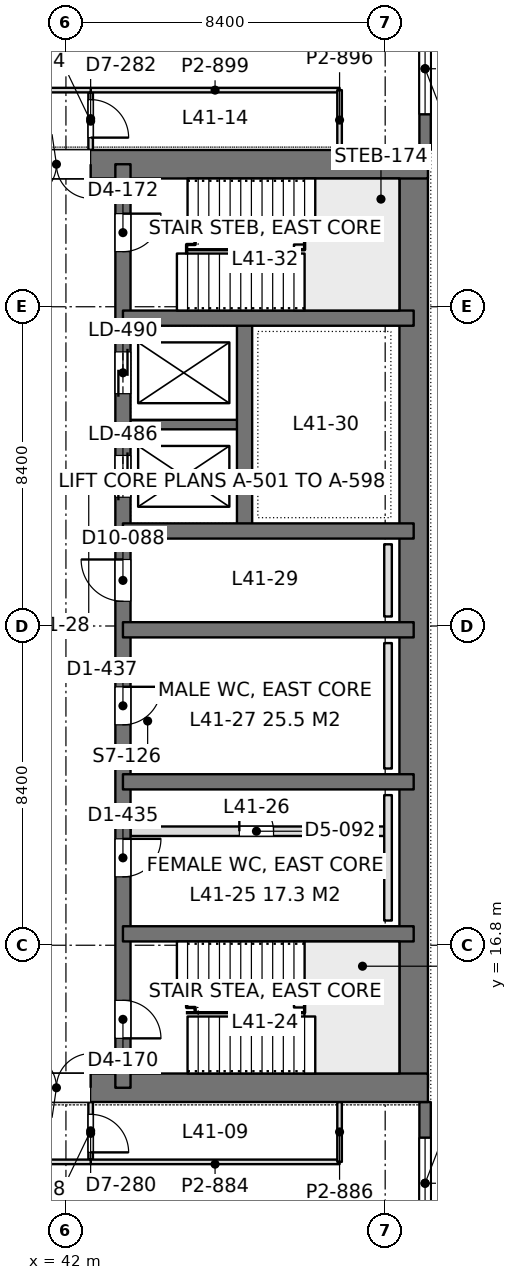
"""IFC4 building model, lengths in metres.
Left out: names, types, materials, properties, quantities, classifications, styles, units other than length and angle.
Written with IfcOpenShell. Run it as: python <this file> out.ifc"""

import sys

from ifc_helpers import new_model, si_unit, direction, frame, frame_2d, origin, place, context, subcontext, project, spatial, rectangle, extrude, element, fill, save


model = new_model("IFC4")
c1 = context("Model", 3, precision=1e-05, world=origin(), true_north=direction((0.0, 1.0)))
c2 = subcontext(c1, "Body", "Model", "MODEL_VIEW")
j1 = project(units=[si_unit("LENGTHUNIT", "METRE"), si_unit("PLANEANGLEUNIT", "RADIAN")], contexts=[c1])
p1 = place(None, origin())
s1 = spatial("IfcSite", under=j1, at=p1, CompositionType="ELEMENT")
p2 = place(p1, origin())
s2 = spatial("IfcBuilding", under=s1, at=p2, CompositionType="ELEMENT")
p3 = place(p2, frame((0.0, 0.0, 181.8)))
s3 = spatial("IfcBuildingStorey", under=s2, at=p3, CompositionType="ELEMENT", Elevation=181.8)
p4 = place(p3, frame((33.675, 13.05, 0.0), z_axis=(0.0, 0.0, 1.0), x_axis=(1.0, 0.0, 0.0)))
e1 = element("IfcWall", 1, at=p4, inside=s3, PredefinedType="SHEAR", context=c2, shape_type="SweptSolid", body=[
    extrude(rectangle(XDim=17.85, YDim=0.75, at=frame_2d((8.925, 0.0))), origin(), (0.0, 0.0, 1.0), 4.2),
])
p5 = place(p4, frame((7.175, 0.0, 0.0)))
e2 = element("IfcOpeningElement", 2, at=p5, cuts=e1, PredefinedType="OPENING", context=c2, shape_type="SweptSolid", body=[
    extrude(rectangle(XDim=1.8, YDim=2.4, at=frame_2d((0.9, 1.2))), frame((0.0, 0.385, 0.0), z_axis=(0.0, -1.0, 0.0), x_axis=(1.0, 0.0, 0.0)), (0.0, 0.0, 1.0), 0.77),
])
p6 = place(p3, frame((33.675, 37.35, 0.0), z_axis=(0.0, 0.0, 1.0), x_axis=(1.0, 0.0, 0.0)))
e3 = element("IfcWall", 3, at=p6, inside=s3, PredefinedType="SHEAR", context=c2, shape_type="SweptSolid", body=[
    extrude(rectangle(XDim=17.85, YDim=0.75, at=frame_2d((8.925, 0.0))), origin(), (0.0, 0.0, 1.0), 4.2),
])
p7 = place(p6, frame((7.175, 0.0, 0.0)))
e4 = element("IfcOpeningElement", 4, at=p7, cuts=e3, PredefinedType="OPENING", context=c2, shape_type="SweptSolid", body=[
    extrude(rectangle(XDim=1.8, YDim=2.4, at=frame_2d((0.9, 1.2))), frame((0.0, 0.385, 0.0), z_axis=(0.0, -1.0, 0.0), x_axis=(1.0, 0.0, 0.0)), (0.0, 0.0, 1.0), 0.77),
])
p8 = place(p3, frame((51.15, 13.05, 0.0), z_axis=(0.0, 0.0, 1.0), x_axis=(0.0, 1.0, 0.0)))
e5 = element("IfcWall", 5, at=p8, inside=s3, PredefinedType="SHEAR", context=c2, shape_type="SweptSolid", body=[
    extrude(rectangle(XDim=24.3, YDim=0.75, at=frame_2d((12.15, 0.0))), origin(), (0.0, 0.0, 1.0), 4.2),
])
p9 = place(p3, frame((43.5, 13.05, 0.0), z_axis=(0.0, 0.0, 1.0), x_axis=(0.0, 1.0, 0.0)))
e6 = element("IfcWall", 6, at=p9, inside=s3, PredefinedType="SHEAR", context=c2, shape_type="SweptSolid", body=[
    extrude(rectangle(XDim=24.3, YDim=0.4, at=frame_2d((12.15, 0.0))), origin(), (0.0, 0.0, 1.0), 4.2),
])
p10 = place(p9, frame((1.3, 0.0, 0.0)))
e7 = element("IfcOpeningElement", 7, at=p10, cuts=e6, PredefinedType="OPENING", context=c2, shape_type="SweptSolid", body=[
    extrude(rectangle(XDim=1.0, YDim=2.2, at=frame_2d((0.5, 1.1))), frame((0.0, 0.21, 0.0), z_axis=(0.0, -1.0, 0.0), x_axis=(1.0, 0.0, 0.0)), (0.0, 0.0, 1.0), 0.42),
])
p11 = place(p9, frame((22.0, 0.0, 0.0)))
e8 = element("IfcOpeningElement", 8, at=p11, cuts=e6, PredefinedType="OPENING", context=c2, shape_type="SweptSolid", body=[
    extrude(rectangle(XDim=1.0, YDim=2.2, at=frame_2d((0.5, 1.1))), frame((0.0, 0.21, 0.0), z_axis=(0.0, -1.0, 0.0), x_axis=(1.0, 0.0, 0.0)), (0.0, 0.0, 1.0), 0.42),
])
p12 = place(p9, frame((5.55, 0.0, 0.0)))
e9 = element("IfcOpeningElement", 9, at=p12, cuts=e6, PredefinedType="OPENING", context=c2, shape_type="SweptSolid", body=[
    extrude(rectangle(XDim=1.0, YDim=2.2, at=frame_2d((0.5, 1.1))), frame((0.0, 0.21, 0.0), z_axis=(0.0, -1.0, 0.0), x_axis=(1.0, 0.0, 0.0)), (0.0, 0.0, 1.0), 0.42),
])
p13 = place(p9, frame((9.55, 0.0, 0.0)))
e10 = element("IfcOpeningElement", 10, at=p13, cuts=e6, PredefinedType="OPENING", context=c2, shape_type="SweptSolid", body=[
    extrude(rectangle(XDim=1.0, YDim=2.2, at=frame_2d((0.5, 1.1))), frame((0.0, 0.21, 0.0), z_axis=(0.0, -1.0, 0.0), x_axis=(1.0, 0.0, 0.0)), (0.0, 0.0, 1.0), 0.42),
])
p14 = place(p9, frame((12.8, 0.0, 0.0)))
e11 = element("IfcOpeningElement", 11, at=p14, cuts=e6, PredefinedType="OPENING", context=c2, shape_type="SweptSolid", body=[
    extrude(rectangle(XDim=1.1, YDim=2.2, at=frame_2d((0.55, 1.1))), frame((0.0, 0.21, 0.0), z_axis=(0.0, -1.0, 0.0), x_axis=(1.0, 0.0, 0.0)), (0.0, 0.0, 1.0), 0.42),
])
p15 = place(p9, frame((15.538, 0.0, 0.0)))
e12 = element("IfcOpeningElement", 12, at=p15, cuts=e6, PredefinedType="OPENING", context=c2, shape_type="SweptSolid", body=[
    extrude(rectangle(XDim=1.1, YDim=2.2, at=frame_2d((0.55, 1.1))), frame((0.0, 0.21, 0.0), z_axis=(0.0, -1.0, 0.0), x_axis=(1.0, 0.0, 0.0)), (0.0, 0.0, 1.0), 0.42),
])
p16 = place(p9, frame((18.262, 0.0, 0.0)))
e13 = element("IfcOpeningElement", 13, at=p16, cuts=e6, PredefinedType="OPENING", context=c2, shape_type="SweptSolid", body=[
    extrude(rectangle(XDim=1.1, YDim=2.2, at=frame_2d((0.55, 1.1))), frame((0.0, 0.21, 0.0), z_axis=(0.0, -1.0, 0.0), x_axis=(1.0, 0.0, 0.0)), (0.0, 0.0, 1.0), 0.42),
])
for number, where, z_axis, x_axis in (
    (14, (51.15, 17.1, 0.0), (0.0, 0.0, 1.0), (-1.0, 0.0, 0.0)),
    (15, (51.15, 21.1, 0.0), (0.0, 0.0, 1.0), (-1.0, 0.0, 0.0)),
    (16, (51.15, 25.1, 0.0), (0.0, 0.0, 1.0), (-1.0, 0.0, 0.0)),
    (17, (51.15, 27.7, 0.0), (0.0, 0.0, 1.0), (-1.0, 0.0, 0.0)),
    (18, (51.15, 33.3, 0.0), (0.0, 0.0, 1.0), (-1.0, 0.0, 0.0)),
):
    element("IfcWall", number, at=place(p3, frame(where, z_axis=z_axis, x_axis=x_axis)), inside=s3, PredefinedType="SHEAR", context=c2, shape_type="SweptSolid", body=[
        extrude(rectangle(XDim=7.65, YDim=0.4, at=frame_2d((3.825, 0.0))), origin(), (0.0, 0.0, 1.0), 4.2),
    ])
p17 = place(p3, frame((46.7, 27.7, 0.0), z_axis=(0.0, 0.0, 1.0), x_axis=(0.0, 1.0, 0.0)))
e19 = element("IfcWall", 19, at=p17, inside=s3, PredefinedType="SHEAR", context=c2, shape_type="SweptSolid", body=[
    extrude(rectangle(XDim=5.6, YDim=0.4, at=frame_2d((2.8, 0.0))), origin(), (0.0, 0.0, 1.0), 4.2),
])
p18 = place(p3, frame((46.7, 30.5, 0.0), z_axis=(0.0, 0.0, 1.0), x_axis=(-1.0, 0.0, 0.0)))
e20 = element("IfcWall", 20, at=p18, inside=s3, PredefinedType="SHEAR", context=c2, shape_type="SweptSolid", body=[
    extrude(rectangle(XDim=3.2, YDim=0.25, at=frame_2d((1.6, 0.0))), origin(), (0.0, 0.0, 1.0), 4.2),
])
p19 = place(p3, frame((51.45, 42.0, 0.0), z_axis=(0.0, 0.0, 1.0), x_axis=(0.0, -1.0, 0.0)))
e21 = element("IfcWall", 21, at=p19, inside=s3, PredefinedType="SOLIDWALL", context=c2, shape_type="SweptSolid", body=[
    extrude(rectangle(XDim=4.275, YDim=0.3, at=frame_2d((2.137, 0.0))), origin(), (0.0, 0.0, 1.0), 4.05),
])
p20 = place(p19, frame((0.938, 0.0, 0.9)))
e22 = element("IfcOpeningElement", 22, at=p20, cuts=e21, PredefinedType="OPENING", context=c2, shape_type="SweptSolid", body=[
    extrude(rectangle(XDim=2.4, YDim=1.9, at=frame_2d((1.2, 0.95))), frame((0.0, 0.16, 0.0), z_axis=(0.0, -1.0, 0.0), x_axis=(1.0, 0.0, 0.0)), (0.0, 0.0, 1.0), 0.32),
])
p21 = place(p3, frame((51.45, 12.675, 0.0), z_axis=(0.0, 0.0, 1.0), x_axis=(0.0, -1.0, 0.0)))
e23 = element("IfcWall", 23, at=p21, inside=s3, PredefinedType="SOLIDWALL", context=c2, shape_type="SweptSolid", body=[
    extrude(rectangle(XDim=4.275, YDim=0.3, at=frame_2d((2.138, 0.0))), origin(), (0.0, 0.0, 1.0), 4.05),
])
p22 = place(p21, frame((0.938, 0.0, 0.9)))
e24 = element("IfcOpeningElement", 24, at=p22, cuts=e23, PredefinedType="OPENING", context=c2, shape_type="SweptSolid", body=[
    extrude(rectangle(XDim=2.4, YDim=1.9, at=frame_2d((1.2, 0.95))), frame((0.0, 0.16, 0.0), z_axis=(0.0, -1.0, 0.0), x_axis=(1.0, 0.0, 0.0)), (0.0, 0.0, 1.0), 0.32),
])
p23 = place(p3, frame((7.748, 11.1, 0.0), z_axis=(0.0, 0.0, 1.0), x_axis=(1.0, 0.0, 0.0)))
e25 = element("IfcWall", 25, at=p23, inside=s3, PredefinedType="PARTITIONING", context=c2, shape_type="SweptSolid", body=[
    extrude(rectangle(XDim=34.904, YDim=0.12, at=frame_2d((17.452, 0.0))), origin(), (0.0, 0.0, 1.0), 3.55),
])
p24 = place(p23, frame((10.735, 0.0, 0.0)))
e26 = element("IfcOpeningElement", 26, at=p24, cuts=e25, PredefinedType="OPENING", context=c2, shape_type="SweptSolid", body=[
    extrude(rectangle(XDim=1.8, YDim=2.2, at=frame_2d((0.9, 1.1))), frame((0.0, 0.07, 0.0), z_axis=(0.0, -1.0, 0.0), x_axis=(1.0, 0.0, 0.0)), (0.0, 0.0, 1.0), 0.14),
])
p25 = place(p23, frame((22.369, 0.0, 0.0)))
e27 = element("IfcOpeningElement", 27, at=p25, cuts=e25, PredefinedType="OPENING", context=c2, shape_type="SweptSolid", body=[
    extrude(rectangle(XDim=1.8, YDim=2.2, at=frame_2d((0.9, 1.1))), frame((0.0, 0.07, 0.0), z_axis=(0.0, -1.0, 0.0), x_axis=(1.0, 0.0, 0.0)), (0.0, 0.0, 1.0), 0.14),
])
p26 = place(p3, frame((42.65, 11.158, 0.0), z_axis=(0.0, 0.0, 1.0), x_axis=(0.0, 1.0, 0.0)))
e28 = element("IfcWall", 28, at=p26, inside=s3, PredefinedType="PARTITIONING", context=c2, shape_type="SweptSolid", body=[
    extrude(rectangle(XDim=1.518, YDim=0.12, at=frame_2d((0.759, 0.0))), origin(), (0.0, 0.0, 1.0), 4.05),
])
p27 = place(p26, frame((0.192, 0.0, 0.0)))
e29 = element("IfcOpeningElement", 29, at=p27, cuts=e28, PredefinedType="OPENING", context=c2, shape_type="SweptSolid", body=[
    extrude(rectangle(XDim=1.0, YDim=2.4, at=frame_2d((0.5, 1.2))), frame((0.0, 0.07, 0.0), z_axis=(0.0, -1.0, 0.0), x_axis=(1.0, 0.0, 0.0)), (0.0, 0.0, 1.0), 0.14),
])
p28 = place(p3, frame((42.648, 11.1, 0.0), z_axis=(0.0, 0.0, 1.0), x_axis=(1.0, 0.0, 0.0)))
e30 = element("IfcWall", 30, at=p28, inside=s3, PredefinedType="PARTITIONING", context=c2, shape_type="SweptSolid", body=[
    extrude(rectangle(XDim=6.552, YDim=0.12, at=frame_2d((3.276, 0.0))), origin(), (0.0, 0.0, 1.0), 4.05),
])
p29 = place(p3, frame((49.2, 11.1, 0.0), z_axis=(0.0, 0.0, 1.0), x_axis=(0.0, 1.0, 0.0)))
e31 = element("IfcWall", 31, at=p29, inside=s3, PredefinedType="PARTITIONING", context=c2, shape_type="SweptSolid", body=[
    extrude(rectangle(XDim=1.576, YDim=0.12, at=frame_2d((0.788, 0.0))), origin(), (0.0, 0.0, 1.0), 4.05),
])
p30 = place(p3, frame((7.748, 39.3, 0.0), z_axis=(0.0, 0.0, 1.0), x_axis=(1.0, 0.0, 0.0)))
e32 = element("IfcWall", 32, at=p30, inside=s3, PredefinedType="PARTITIONING", context=c2, shape_type="SweptSolid", body=[
    extrude(rectangle(XDim=34.904, YDim=0.12, at=frame_2d((17.452, 0.0))), origin(), (0.0, 0.0, 1.0), 3.55),
])
p31 = place(p30, frame((10.735, 0.0, 0.0)))
e33 = element("IfcOpeningElement", 33, at=p31, cuts=e32, PredefinedType="OPENING", context=c2, shape_type="SweptSolid", body=[
    extrude(rectangle(XDim=1.8, YDim=2.2, at=frame_2d((0.9, 1.1))), frame((0.0, 0.07, 0.0), z_axis=(0.0, -1.0, 0.0), x_axis=(1.0, 0.0, 0.0)), (0.0, 0.0, 1.0), 0.14),
])
p32 = place(p30, frame((22.369, 0.0, 0.0)))
e34 = element("IfcOpeningElement", 34, at=p32, cuts=e32, PredefinedType="OPENING", context=c2, shape_type="SweptSolid", body=[
    extrude(rectangle(XDim=1.8, YDim=2.2, at=frame_2d((0.9, 1.1))), frame((0.0, 0.07, 0.0), z_axis=(0.0, -1.0, 0.0), x_axis=(1.0, 0.0, 0.0)), (0.0, 0.0, 1.0), 0.14),
])
p33 = place(p3, frame((42.65, 37.724, 0.0), z_axis=(0.0, 0.0, 1.0), x_axis=(0.0, 1.0, 0.0)))
e35 = element("IfcWall", 35, at=p33, inside=s3, PredefinedType="PARTITIONING", context=c2, shape_type="SweptSolid", body=[
    extrude(rectangle(XDim=1.518, YDim=0.12, at=frame_2d((0.759, 0.0))), origin(), (0.0, 0.0, 1.0), 4.05),
])
p34 = place(p33, frame((0.326, 0.0, 0.0)))
e36 = element("IfcOpeningElement", 36, at=p34, cuts=e35, PredefinedType="OPENING", context=c2, shape_type="SweptSolid", body=[
    extrude(rectangle(XDim=1.0, YDim=2.4, at=frame_2d((0.5, 1.2))), frame((0.0, 0.07, 0.0), z_axis=(0.0, -1.0, 0.0), x_axis=(1.0, 0.0, 0.0)), (0.0, 0.0, 1.0), 0.14),
])
p35 = place(p3, frame((42.648, 39.3, 0.0), z_axis=(0.0, 0.0, 1.0), x_axis=(1.0, 0.0, 0.0)))
e37 = element("IfcWall", 37, at=p35, inside=s3, PredefinedType="PARTITIONING", context=c2, shape_type="SweptSolid", body=[
    extrude(rectangle(XDim=6.552, YDim=0.12, at=frame_2d((3.276, 0.0))), origin(), (0.0, 0.0, 1.0), 3.69),
])
p36 = place(p3, frame((49.2, 37.724, 0.0), z_axis=(0.0, 0.0, 1.0), x_axis=(0.0, 1.0, 0.0)))
e38 = element("IfcWall", 38, at=p36, inside=s3, PredefinedType="PARTITIONING", context=c2, shape_type="SweptSolid", body=[
    extrude(rectangle(XDim=1.576, YDim=0.12, at=frame_2d((0.788, 0.0))), origin(), (0.0, 0.0, 1.0), 4.05),
])
p37 = place(p3, frame((43.7, 19.8, 0.0), z_axis=(0.0, 0.0, 1.0), x_axis=(1.0, 0.0, 0.0)))
e39 = element("IfcWall", 39, at=p37, inside=s3, PredefinedType="PARTITIONING", context=c2, shape_type="SweptSolid", body=[
    extrude(rectangle(XDim=6.675, YDim=0.25, at=frame_2d((3.337, 0.0))), origin(), (0.0, 0.0, 1.0), 4.0),
])
p38 = place(p37, frame((2.863, 0.0, 0.0)))
e40 = element("IfcOpeningElement", 40, at=p38, cuts=e39, PredefinedType="OPENING", context=c2, shape_type="SweptSolid", body=[
    extrude(rectangle(XDim=0.9, YDim=2.2, at=frame_2d((0.45, 1.1))), frame((0.0, 0.135, 0.0), z_axis=(0.0, -1.0, 0.0), x_axis=(1.0, 0.0, 0.0)), (0.0, 0.0, 1.0), 0.27),
])
for number, where, z_axis, x_axis in (
    (41, (50.475, 17.45, 0.0), (0.0, 0.0, 1.0), (0.0, 1.0, 0.0)),
    (42, (50.475, 21.45, 0.0), (0.0, 0.0, 1.0), (0.0, 1.0, 0.0)),
):
    element("IfcWall", number, at=place(p3, frame(where, z_axis=z_axis, x_axis=x_axis)), inside=s3, PredefinedType="PLUMBINGWALL", context=c2, shape_type="SweptSolid", body=[
        extrude(rectangle(XDim=3.3, YDim=0.2, at=frame_2d((1.65, 0.0))), origin(), (0.0, 0.0, 1.0), 1.2),
    ])
p39 = place(p3, frame((50.475, 25.45, 0.0), z_axis=(0.0, 0.0, 1.0), x_axis=(0.0, 1.0, 0.0)))
e43 = element("IfcWall", 43, at=p39, inside=s3, PredefinedType="PLUMBINGWALL", context=c2, shape_type="SweptSolid", body=[
    extrude(rectangle(XDim=1.9, YDim=0.2, at=frame_2d((0.95, 0.0))), origin(), (0.0, 0.0, 1.0), 1.2),
])
p40 = place(p20, origin())
e44 = element("IfcWindow", 44, at=p40, inside=s3, PartitioningType="SINGLE_PANEL", PredefinedType="WINDOW", context=c2, shape_type="SweptSolid", body=[
    extrude(rectangle(XDim=2.4, YDim=1.9, at=frame_2d((1.2, 0.95))), frame((0.0, 0.03, 0.0), z_axis=(0.0, -1.0, 0.0), x_axis=(1.0, 0.0, 0.0)), (0.0, 0.0, 1.0), 0.06),
])
fill(e22, e44)
p41 = place(p22, origin())
e45 = element("IfcWindow", 45, at=p41, inside=s3, PartitioningType="SINGLE_PANEL", PredefinedType="WINDOW", context=c2, shape_type="SweptSolid", body=[
    extrude(rectangle(XDim=2.4, YDim=1.9, at=frame_2d((1.2, 0.95))), frame((0.0, 0.03, 0.0), z_axis=(0.0, -1.0, 0.0), x_axis=(1.0, 0.0, 0.0)), (0.0, 0.0, 1.0), 0.06),
])
fill(e24, e45)
p42 = place(p5, origin())
e46 = element("IfcDoor", 46, at=p42, inside=s3, OperationType="DOUBLE_DOOR_SINGLE_SWING", PredefinedType="DOOR", context=c2, shape_type="SweptSolid", body=[
    extrude(rectangle(XDim=1.8, YDim=2.4, at=frame_2d((0.9, 1.2))), frame((0.0, 0.025, 0.0), z_axis=(0.0, -1.0, 0.0), x_axis=(1.0, 0.0, 0.0)), (0.0, 0.0, 1.0), 0.05),
])
fill(e2, e46)
p43 = place(p7, frame((1.8, 0.0, 0.0), z_axis=(0.0, 0.0, 1.0), x_axis=(-1.0, 0.0, 0.0)))
e47 = element("IfcDoor", 47, at=p43, inside=s3, OperationType="DOUBLE_DOOR_SINGLE_SWING", PredefinedType="DOOR", context=c2, shape_type="SweptSolid", body=[
    extrude(rectangle(XDim=1.8, YDim=2.4, at=frame_2d((0.9, 1.2))), frame((0.0, 0.025, 0.0), z_axis=(0.0, -1.0, 0.0), x_axis=(1.0, 0.0, 0.0)), (0.0, 0.0, 1.0), 0.05),
])
fill(e4, e47)
p44 = place(p10, frame((1.0, 0.0, 0.0), z_axis=(0.0, 0.0, 1.0), x_axis=(-1.0, 0.0, 0.0)))
e48 = element("IfcDoor", 48, at=p44, inside=s3, OperationType="SINGLE_SWING_RIGHT", PredefinedType="DOOR", context=c2, shape_type="SweptSolid", body=[
    extrude(rectangle(XDim=1.0, YDim=2.2, at=frame_2d((0.5, 1.1))), frame((0.0, 0.025, 0.0), z_axis=(0.0, -1.0, 0.0), x_axis=(1.0, 0.0, 0.0)), (0.0, 0.0, 1.0), 0.05),
])
fill(e7, e48)
p45 = place(p11, frame((1.0, 0.0, 0.0), z_axis=(0.0, 0.0, 1.0), x_axis=(-1.0, 0.0, 0.0)))
e49 = element("IfcDoor", 49, at=p45, inside=s3, OperationType="SINGLE_SWING_LEFT", PredefinedType="DOOR", context=c2, shape_type="SweptSolid", body=[
    extrude(rectangle(XDim=1.0, YDim=2.2, at=frame_2d((0.5, 1.1))), frame((0.0, 0.025, 0.0), z_axis=(0.0, -1.0, 0.0), x_axis=(1.0, 0.0, 0.0)), (0.0, 0.0, 1.0), 0.05),
])
fill(e8, e49)
p46 = place(p12, frame((1.0, 0.0, 0.0), z_axis=(0.0, 0.0, 1.0), x_axis=(-1.0, 0.0, 0.0)))
e50 = element("IfcDoor", 50, at=p46, inside=s3, OperationType="SINGLE_SWING_LEFT", PredefinedType="DOOR", context=c2, shape_type="SweptSolid", body=[
    extrude(rectangle(XDim=1.0, YDim=2.2, at=frame_2d((0.5, 1.1))), frame((0.0, 0.025, 0.0), z_axis=(0.0, -1.0, 0.0), x_axis=(1.0, 0.0, 0.0)), (0.0, 0.0, 1.0), 0.05),
])
fill(e9, e50)
p47 = place(p13, frame((1.0, 0.0, 0.0), z_axis=(0.0, 0.0, 1.0), x_axis=(-1.0, 0.0, 0.0)))
e51 = element("IfcDoor", 51, at=p47, inside=s3, OperationType="SINGLE_SWING_LEFT", PredefinedType="DOOR", context=c2, shape_type="SweptSolid", body=[
    extrude(rectangle(XDim=1.0, YDim=2.2, at=frame_2d((0.5, 1.1))), frame((0.0, 0.025, 0.0), z_axis=(0.0, -1.0, 0.0), x_axis=(1.0, 0.0, 0.0)), (0.0, 0.0, 1.0), 0.05),
])
fill(e10, e51)
p48 = place(p14, origin())
e52 = element("IfcDoor", 52, at=p48, inside=s3, OperationType="SINGLE_SWING_RIGHT", PredefinedType="DOOR", context=c2, shape_type="SweptSolid", body=[
    extrude(rectangle(XDim=1.1, YDim=2.2, at=frame_2d((0.55, 1.1))), frame((0.0, 0.025, 0.0), z_axis=(0.0, -1.0, 0.0), x_axis=(1.0, 0.0, 0.0)), (0.0, 0.0, 1.0), 0.05),
])
fill(e11, e52)
p49 = place(p15, origin())
e53 = element("IfcDoor", 53, at=p49, inside=s3, OperationType="DOUBLE_DOOR_SLIDING", PredefinedType="DOOR", context=c2, shape_type="SweptSolid", body=[
    extrude(rectangle(XDim=1.1, YDim=2.2, at=frame_2d((0.55, 1.1))), frame((0.0, 0.025, 0.0), z_axis=(0.0, -1.0, 0.0), x_axis=(1.0, 0.0, 0.0)), (0.0, 0.0, 1.0), 0.05),
])
fill(e12, e53)
p50 = place(p16, origin())
e54 = element("IfcDoor", 54, at=p50, inside=s3, OperationType="DOUBLE_DOOR_SLIDING", PredefinedType="DOOR", context=c2, shape_type="SweptSolid", body=[
    extrude(rectangle(XDim=1.1, YDim=2.2, at=frame_2d((0.55, 1.1))), frame((0.0, 0.025, 0.0), z_axis=(0.0, -1.0, 0.0), x_axis=(1.0, 0.0, 0.0)), (0.0, 0.0, 1.0), 0.05),
])
fill(e13, e54)
p51 = place(p27, frame((1.0, 0.0, 0.0), z_axis=(0.0, 0.0, 1.0), x_axis=(-1.0, 0.0, 0.0)))
e55 = element("IfcDoor", 55, at=p51, inside=s3, OperationType="SINGLE_SWING_RIGHT", PredefinedType="DOOR", context=c2, shape_type="SweptSolid", body=[
    extrude(rectangle(XDim=1.0, YDim=2.4, at=frame_2d((0.5, 1.2))), frame((0.0, 0.025, 0.0), z_axis=(0.0, -1.0, 0.0), x_axis=(1.0, 0.0, 0.0)), (0.0, 0.0, 1.0), 0.05),
])
fill(e29, e55)
p52 = place(p34, frame((1.0, 0.0, 0.0), z_axis=(0.0, 0.0, 1.0), x_axis=(-1.0, 0.0, 0.0)))
e56 = element("IfcDoor", 56, at=p52, inside=s3, OperationType="SINGLE_SWING_RIGHT", PredefinedType="DOOR", context=c2, shape_type="SweptSolid", body=[
    extrude(rectangle(XDim=1.0, YDim=2.4, at=frame_2d((0.5, 1.2))), frame((0.0, 0.025, 0.0), z_axis=(0.0, -1.0, 0.0), x_axis=(1.0, 0.0, 0.0)), (0.0, 0.0, 1.0), 0.05),
])
fill(e36, e56)
p53 = place(p38, origin())
e57 = element("IfcDoor", 57, at=p53, inside=s3, OperationType="SINGLE_SWING_LEFT", PredefinedType="DOOR", context=c2, shape_type="SweptSolid", body=[
    extrude(rectangle(XDim=0.9, YDim=2.2, at=frame_2d((0.45, 1.1))), frame((0.0, 0.025, 0.0), z_axis=(0.0, -1.0, 0.0), x_axis=(1.0, 0.0, 0.0)), (0.0, 0.0, 1.0), 0.05),
])
fill(e40, e57)
save(model, sys.argv[1])
